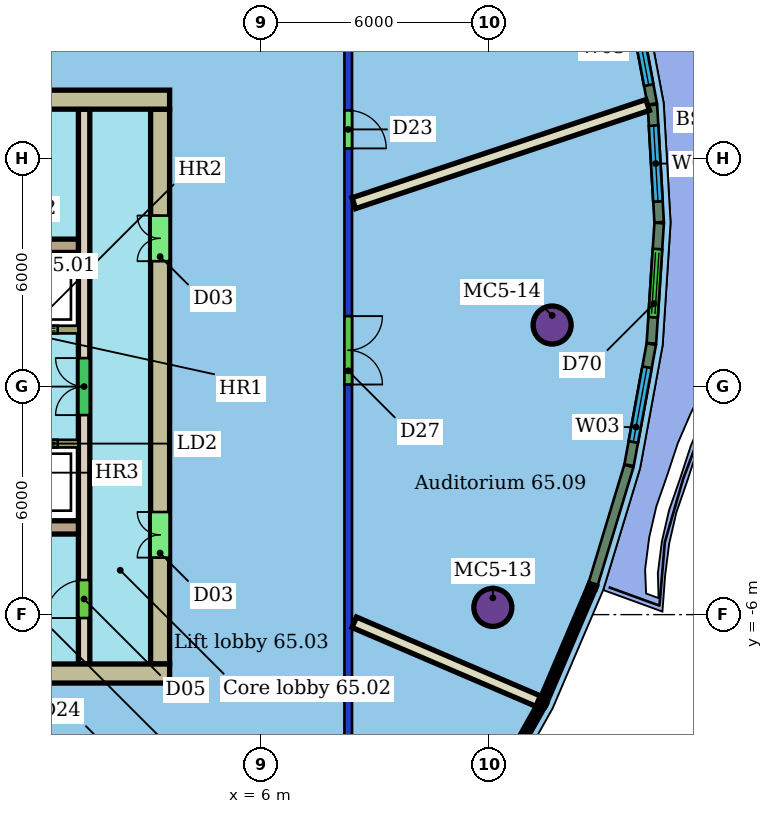
"""IFC4 building model, lengths in metres.
Left out: names, types, materials, properties, quantities, classifications, styles, units other than length and angle.
Written with IfcOpenShell. Run it as: python <this file> out.ifc"""

import sys

from ifc_helpers import new_model, si_unit, direction, frame, frame_2d, origin, origin_2d, place, context, subcontext, project, spatial, rectangle, hollow_circle, extrude, element, fill, save


model = new_model("IFC4")
c1 = context("Model", 3, precision=1e-05, world=origin(), true_north=direction((0.0, 1.0)))
c2 = subcontext(c1, "Body", "Model", "MODEL_VIEW")
j1 = project(units=[si_unit("LENGTHUNIT", "METRE"), si_unit("PLANEANGLEUNIT", "RADIAN")], contexts=[c1])
p1 = place(None, origin())
s1 = spatial("IfcSite", under=j1, at=p1, CompositionType="ELEMENT")
p2 = place(p1, origin())
s2 = spatial("IfcBuilding", under=s1, at=p2, CompositionType="ELEMENT")
p3 = place(p2, frame((0.0, 0.0, 264.9)))
s3 = spatial("IfcBuildingStorey", under=s2, at=p3, CompositionType="ELEMENT", Elevation=264.9)
for number, where, z_axis, x_axis in (
    (1, (12.106, -5.81, 0.0), (0.0, 0.0, 1.0), (1.0, 0.0, 0.0)),
    (2, (13.666, 1.62, 0.0), (0.0, 0.0, 1.0), (1.0, 0.0, 0.0)),
):
    element("IfcColumn", number, at=place(p3, frame(where, z_axis=z_axis, x_axis=x_axis)), inside=s3, PredefinedType="COLUMN", context=c2, shape_type="SweptSolid", body=[
        extrude(hollow_circle(Radius=0.5, WallThickness=0.04, at=origin_2d()), origin(), (0.0, 0.0, 1.0), 3.45),
    ])
p4 = place(p3, frame((8.3, 9.8, 0.0), z_axis=(0.0, 0.0, 1.0), x_axis=(0.0, -1.0, 0.0)))
e3 = element("IfcWall", 3, at=p4, inside=s3, PredefinedType="PARTITIONING", context=c2, shape_type="SweptSolid", body=[
    extrude(rectangle(XDim=19.6, YDim=0.2, at=frame_2d((9.8, 0.0))), origin(), (0.0, 0.0, 1.0), 3.1),
])
p5 = place(p4, frame((7.946, 0.0, 0.0)))
e4 = element("IfcOpeningElement", 4, at=p5, cuts=e3, PredefinedType="OPENING", context=c2, shape_type="SweptSolid", body=[
    extrude(rectangle(XDim=1.8, YDim=2.4, at=frame_2d((0.9, 1.2))), frame((0.0, 0.11, 0.0), z_axis=(0.0, -1.0, 0.0), x_axis=(1.0, 0.0, 0.0)), (0.0, 0.0, 1.0), 0.22),
])
p6 = place(p4, frame((2.533, 0.0, 0.0)))
e5 = element("IfcOpeningElement", 5, at=p6, cuts=e3, PredefinedType="OPENING", context=c2, shape_type="SweptSolid", body=[
    extrude(rectangle(XDim=1.0, YDim=2.4, at=frame_2d((0.5, 1.2))), frame((0.0, 0.11, 0.0), z_axis=(0.0, -1.0, 0.0), x_axis=(1.0, 0.0, 0.0)), (0.0, 0.0, 1.0), 0.22),
])
p7 = place(p3, frame((13.298, -8.276, 0.0), z_axis=(0.0, 0.0, 1.0), x_axis=(-0.919039472238, 0.39416550898, 0.0)))
e6 = element("IfcWall", 6, at=p7, inside=s3, PredefinedType="PARTITIONING", context=c2, shape_type="SweptSolid", body=[
    extrude(rectangle(XDim=5.265, YDim=0.3, at=frame_2d((2.633, 0.0))), origin(), (0.0, 0.0, 1.0), 3.45),
])
p8 = place(p3, frame((16.179, 7.409, 0.0), z_axis=(0.0, 0.0, 1.0), x_axis=(-0.948479442835, -0.316838675858, 0.0)))
e7 = element("IfcWall", 7, at=p8, inside=s3, PredefinedType="PARTITIONING", context=c2, shape_type="SweptSolid", body=[
    extrude(rectangle(XDim=8.152, YDim=0.3, at=frame_2d((4.076, 0.0))), origin(), (0.0, 0.0, 1.0), 3.45),
])
p9 = place(p3, frame((14.744, -5.197, 0.0), z_axis=(0.0, 0.0, 1.0), x_axis=(0.289926029866, 0.957049056844, 0.0)))
e8 = element("IfcWall", 8, at=p9, inside=s3, PredefinedType="SOLIDWALL", context=c2, shape_type="SweptSolid", body=[
    extrude(rectangle(XDim=3.248, YDim=0.25, at=frame_2d((1.624, 0.0))), origin(), (0.0, 0.0, 1.0), 3.15),
])
p10 = place(p3, frame((15.691, -2.067, 0.0), z_axis=(0.0, 0.0, 1.0), x_axis=(0.180457976696, 0.983582695378, 0.0)))
e9 = element("IfcWall", 9, at=p10, inside=s3, PredefinedType="SOLIDWALL", context=c2, shape_type="SweptSolid", body=[
    extrude(rectangle(XDim=3.238, YDim=0.25, at=frame_2d((1.619, 0.0))), origin(), (0.0, 0.0, 1.0), 3.15),
])
p11 = place(p10, frame((0.619, 0.0, 0.9)))
e10 = element("IfcOpeningElement", 10, at=p11, cuts=e9, PredefinedType="OPENING", context=c2, shape_type="SweptSolid", body=[
    extrude(rectangle(XDim=2.0, YDim=2.1, at=frame_2d((1.0, 1.05))), frame((0.0, 0.135, 0.0), z_axis=(0.0, -1.0, 0.0), x_axis=(1.0, 0.0, 0.0)), (0.0, 0.0, 1.0), 0.27),
])
p12 = place(p3, frame((16.278, 1.139, 0.0), z_axis=(0.0, 0.0, 1.0), x_axis=(0.064473835275, 0.99791939783, 0.0)))
e11 = element("IfcWall", 11, at=p12, inside=s3, PredefinedType="SOLIDWALL", context=c2, shape_type="SweptSolid", body=[
    extrude(rectangle(XDim=3.169, YDim=0.25, at=frame_2d((1.585, 0.0))), origin(), (0.0, 0.0, 1.0), 3.15),
])
p13 = place(p12, frame((0.685, 0.0, 0.0)))
e12 = element("IfcOpeningElement", 12, at=p13, cuts=e11, PredefinedType="OPENING", context=c2, shape_type="SweptSolid", body=[
    extrude(rectangle(XDim=1.8, YDim=2.4, at=frame_2d((0.9, 1.2))), frame((0.0, 0.135, 0.0), z_axis=(0.0, -1.0, 0.0), x_axis=(1.0, 0.0, 0.0)), (0.0, 0.0, 1.0), 0.27),
])
p14 = place(p3, frame((16.482, 4.325, 0.0), z_axis=(0.0, 0.0, 1.0), x_axis=(-0.057643453345, 0.998337233747, 0.0)))
e13 = element("IfcWall", 13, at=p14, inside=s3, PredefinedType="SOLIDWALL", context=c2, shape_type="SweptSolid", body=[
    extrude(rectangle(XDim=3.092, YDim=0.25, at=frame_2d((1.546, 0.0))), origin(), (0.0, 0.0, 1.0), 3.15),
])
p15 = place(p14, frame((0.546, 0.0, 0.9)))
e14 = element("IfcOpeningElement", 14, at=p15, cuts=e13, PredefinedType="OPENING", context=c2, shape_type="SweptSolid", body=[
    extrude(rectangle(XDim=2.0, YDim=2.1, at=frame_2d((1.0, 1.05))), frame((0.0, 0.135, 0.0), z_axis=(0.0, -1.0, 0.0), x_axis=(1.0, 0.0, 0.0)), (0.0, 0.0, 1.0), 0.27),
])
p16 = place(p3, frame((16.301, 7.436, 0.0), z_axis=(0.0, 0.0, 1.0), x_axis=(-0.184915563493, 0.982754412037, 0.0)))
e15 = element("IfcWall", 15, at=p16, inside=s3, PredefinedType="SOLIDWALL", context=c2, shape_type="SweptSolid", body=[
    extrude(rectangle(XDim=3.009, YDim=0.25, at=frame_2d((1.504, 0.0))), origin(), (0.0, 0.0, 1.0), 3.15),
])
p17 = place(p16, frame((0.505, 0.0, 0.9)))
e16 = element("IfcOpeningElement", 16, at=p17, cuts=e15, PredefinedType="OPENING", context=c2, shape_type="SweptSolid", body=[
    extrude(rectangle(XDim=2.0, YDim=2.1, at=frame_2d((1.0, 1.05))), frame((0.0, 0.135, 0.0), z_axis=(0.0, -1.0, 0.0), x_axis=(1.0, 0.0, 0.0)), (0.0, 0.0, 1.0), 0.27),
])
p18 = place(p3, frame((3.6, 7.55, 0.0), z_axis=(0.0, 0.0, 1.0), x_axis=(-1.0, 0.0, 0.0)))
e17 = element("IfcWall", 17, at=p18, inside=s3, PredefinedType="SHEAR", context=c2, shape_type="SweptSolid", body=[
    extrude(rectangle(XDim=9.6, YDim=0.5, at=frame_2d((4.8, 0.0))), origin(), (0.0, 0.0, 1.0), 3.3),
])
p19 = place(p18, frame((3.2, 0.0, 0.0)))
e18 = element("IfcOpeningElement", 18, at=p19, cuts=e17, PredefinedType="OPENING", context=c2, shape_type="SweptSolid", body=[
    extrude(rectangle(XDim=1.2, YDim=2.1, at=frame_2d((0.6, 1.05))), frame((0.0, 0.26, 0.0), z_axis=(0.0, -1.0, 0.0), x_axis=(1.0, 0.0, 0.0)), (0.0, 0.0, 1.0), 0.52),
])
p20 = place(p3, frame((-15.6, -7.55, 0.0), z_axis=(0.0, 0.0, 1.0), x_axis=(1.0, 0.0, 0.0)))
e19 = element("IfcWall", 19, at=p20, inside=s3, PredefinedType="SHEAR", context=c2, shape_type="SweptSolid", body=[
    extrude(rectangle(XDim=19.2, YDim=0.5, at=frame_2d((9.6, 0.0))), origin(), (0.0, 0.0, 1.0), 3.3),
])
p21 = place(p20, frame((3.6, 0.0, 0.0)))
e20 = element("IfcOpeningElement", 20, at=p21, cuts=e19, PredefinedType="OPENING", context=c2, shape_type="SweptSolid", body=[
    extrude(rectangle(XDim=1.2, YDim=2.1, at=frame_2d((0.6, 1.05))), frame((0.0, 0.26, 0.0), z_axis=(0.0, -1.0, 0.0), x_axis=(1.0, 0.0, 0.0)), (0.0, 0.0, 1.0), 0.52),
])
p22 = place(p3, frame((3.35, -7.3, 0.0), z_axis=(0.0, 0.0, 1.0), x_axis=(0.0, 1.0, 0.0)))
e21 = element("IfcWall", 21, at=p22, inside=s3, PredefinedType="SHEAR", context=c2, shape_type="SweptSolid", body=[
    extrude(rectangle(XDim=14.6, YDim=0.5, at=frame_2d((7.3, 0.0))), origin(), (0.0, 0.0, 1.0), 3.3),
])
p23 = place(p22, frame((2.8, 0.0, 0.0)))
e22 = element("IfcOpeningElement", 22, at=p23, cuts=e21, PredefinedType="OPENING", context=c2, shape_type="SweptSolid", body=[
    extrude(rectangle(XDim=1.2, YDim=2.1, at=frame_2d((0.6, 1.05))), frame((0.0, 0.26, 0.0), z_axis=(0.0, -1.0, 0.0), x_axis=(1.0, 0.0, 0.0)), (0.0, 0.0, 1.0), 0.52),
])
p24 = place(p22, frame((10.6, 0.0, 0.0)))
e23 = element("IfcOpeningElement", 23, at=p24, cuts=e21, PredefinedType="OPENING", context=c2, shape_type="SweptSolid", body=[
    extrude(rectangle(XDim=1.2, YDim=2.1, at=frame_2d((0.6, 1.05))), frame((0.0, 0.26, 0.0), z_axis=(0.0, -1.0, 0.0), x_axis=(1.0, 0.0, 0.0)), (0.0, 0.0, 1.0), 0.52),
])
for number, where, z_axis, x_axis in (
    (24, (-6.0, 3.705, 0.0), (0.0, 0.0, 1.0), (1.0, 0.0, 0.0)),
    (25, (-6.0, -3.705, 0.0), (0.0, 0.0, 1.0), (1.0, 0.0, 0.0)),
):
    element("IfcWall", number, at=place(p3, frame(where, z_axis=z_axis, x_axis=x_axis)), inside=s3, PredefinedType="SHEAR", context=c2, shape_type="SweptSolid", body=[
        extrude(rectangle(XDim=7.2, YDim=0.35, at=frame_2d((3.6, 0.0))), origin(), (0.0, 0.0, 1.0), 3.3),
    ])
p25 = place(p3, frame((1.35, -7.3, 0.0), z_axis=(0.0, 0.0, 1.0), x_axis=(0.0, 1.0, 0.0)))
e26 = element("IfcWall", 26, at=p25, inside=s3, PredefinedType="SHEAR", context=c2, shape_type="SweptSolid", body=[
    extrude(rectangle(XDim=14.6, YDim=0.3, at=frame_2d((7.3, 0.0))), origin(), (0.0, 0.0, 1.0), 3.3),
])
p26 = place(p25, frame((1.21, 0.0, 0.0)))
e27 = element("IfcOpeningElement", 27, at=p26, cuts=e26, PredefinedType="OPENING", context=c2, shape_type="SweptSolid", body=[
    extrude(rectangle(XDim=1.0, YDim=2.1, at=frame_2d((0.5, 1.05))), frame((0.0, 0.16, 0.0), z_axis=(0.0, -1.0, 0.0), x_axis=(1.0, 0.0, 0.0)), (0.0, 0.0, 1.0), 0.32),
])
p27 = place(p25, frame((6.55, 0.0, 0.0)))
e28 = element("IfcOpeningElement", 28, at=p27, cuts=e26, PredefinedType="OPENING", context=c2, shape_type="SweptSolid", body=[
    extrude(rectangle(XDim=1.5, YDim=2.1, at=frame_2d((0.75, 1.05))), frame((0.0, 0.16, 0.0), z_axis=(0.0, -1.0, 0.0), x_axis=(1.0, 0.0, 0.0)), (0.0, 0.0, 1.0), 0.32),
])
p28 = place(p3, frame((-13.2, 1.5, 0.0), z_axis=(0.0, 0.0, 1.0), x_axis=(1.0, 0.0, 0.0)))
e29 = element("IfcWall", 29, at=p28, inside=s3, PredefinedType="SHEAR", context=c2, shape_type="SweptSolid", body=[
    extrude(rectangle(XDim=14.4, YDim=0.2, at=frame_2d((7.2, 0.0))), origin(), (0.0, 0.0, 1.0), 3.3),
])
p29 = place(p28, frame((10.312, 0.0, 0.0)))
e30 = element("IfcOpeningElement", 30, at=p29, cuts=e29, PredefinedType="OPENING", context=c2, shape_type="SweptSolid", body=[
    extrude(rectangle(XDim=1.1, YDim=2.1, at=frame_2d((0.55, 1.05))), frame((0.0, 0.11, 0.0), z_axis=(0.0, -1.0, 0.0), x_axis=(1.0, 0.0, 0.0)), (0.0, 0.0, 1.0), 0.22),
])
p30 = place(p28, frame((12.754, 0.0, 0.0)))
e31 = element("IfcOpeningElement", 31, at=p30, cuts=e29, PredefinedType="OPENING", context=c2, shape_type="SweptSolid", body=[
    extrude(rectangle(XDim=1.1, YDim=2.1, at=frame_2d((0.55, 1.05))), frame((0.0, 0.11, 0.0), z_axis=(0.0, -1.0, 0.0), x_axis=(1.0, 0.0, 0.0)), (0.0, 0.0, 1.0), 0.22),
])
p31 = place(p28, frame((0.15, 0.0, 0.0)))
e32 = element("IfcOpeningElement", 32, at=p31, cuts=e29, PredefinedType="OPENING", context=c2, shape_type="SweptSolid", body=[
    extrude(rectangle(XDim=0.9, YDim=2.1, at=frame_2d((0.45, 1.05))), frame((0.0, 0.11, 0.0), z_axis=(0.0, -1.0, 0.0), x_axis=(1.0, 0.0, 0.0)), (0.0, 0.0, 1.0), 0.22),
])
p32 = place(p28, frame((3.365, 0.0, 0.0)))
e33 = element("IfcOpeningElement", 33, at=p32, cuts=e29, PredefinedType="OPENING", context=c2, shape_type="SweptSolid", body=[
    extrude(rectangle(XDim=1.0, YDim=2.1, at=frame_2d((0.5, 1.05))), frame((0.0, 0.11, 0.0), z_axis=(0.0, -1.0, 0.0), x_axis=(1.0, 0.0, 0.0)), (0.0, 0.0, 1.0), 0.22),
])
p33 = place(p28, frame((8.467, 0.0, 0.0)))
e34 = element("IfcOpeningElement", 34, at=p33, cuts=e29, PredefinedType="OPENING", context=c2, shape_type="SweptSolid", body=[
    extrude(rectangle(XDim=0.9, YDim=2.1, at=frame_2d((0.45, 1.05))), frame((0.0, 0.11, 0.0), z_axis=(0.0, -1.0, 0.0), x_axis=(1.0, 0.0, 0.0)), (0.0, 0.0, 1.0), 0.22),
])
p34 = place(p3, frame((1.2, -1.5, 0.0), z_axis=(0.0, 0.0, 1.0), x_axis=(-1.0, 0.0, 0.0)))
e35 = element("IfcWall", 35, at=p34, inside=s3, PredefinedType="SHEAR", context=c2, shape_type="SweptSolid", body=[
    extrude(rectangle(XDim=14.4, YDim=0.2, at=frame_2d((7.2, 0.0))), origin(), (0.0, 0.0, 1.0), 3.3),
])
p35 = place(p34, frame((7.821, 0.0, 0.0)))
e36 = element("IfcOpeningElement", 36, at=p35, cuts=e35, PredefinedType="OPENING", context=c2, shape_type="SweptSolid", body=[
    extrude(rectangle(XDim=1.2, YDim=2.1, at=frame_2d((0.6, 1.05))), frame((0.0, 0.11, 0.0), z_axis=(0.0, -1.0, 0.0), x_axis=(1.0, 0.0, 0.0)), (0.0, 0.0, 1.0), 0.22),
])
p36 = place(p34, frame((0.546, 0.0, 0.0)))
e37 = element("IfcOpeningElement", 37, at=p36, cuts=e35, PredefinedType="OPENING", context=c2, shape_type="SweptSolid", body=[
    extrude(rectangle(XDim=1.1, YDim=2.1, at=frame_2d((0.55, 1.05))), frame((0.0, 0.11, 0.0), z_axis=(0.0, -1.0, 0.0), x_axis=(1.0, 0.0, 0.0)), (0.0, 0.0, 1.0), 0.22),
])
p37 = place(p34, frame((5.632, 0.0, 0.0)))
e38 = element("IfcOpeningElement", 38, at=p37, cuts=e35, PredefinedType="OPENING", context=c2, shape_type="SweptSolid", body=[
    extrude(rectangle(XDim=1.0, YDim=2.1, at=frame_2d((0.5, 1.05))), frame((0.0, 0.11, 0.0), z_axis=(0.0, -1.0, 0.0), x_axis=(1.0, 0.0, 0.0)), (0.0, 0.0, 1.0), 0.22),
])
p38 = place(p34, frame((2.592, 0.0, 0.0)))
e39 = element("IfcOpeningElement", 39, at=p38, cuts=e35, PredefinedType="OPENING", context=c2, shape_type="SweptSolid", body=[
    extrude(rectangle(XDim=1.0, YDim=2.1, at=frame_2d((0.5, 1.05))), frame((0.0, 0.11, 0.0), z_axis=(0.0, -1.0, 0.0), x_axis=(1.0, 0.0, 0.0)), (0.0, 0.0, 1.0), 0.22),
])
p39 = place(p5, origin())
e40 = element("IfcDoor", 40, at=p39, inside=s3, OperationType="DOUBLE_DOOR_SINGLE_SWING", PredefinedType="DOOR", context=c2, shape_type="SweptSolid", body=[
    extrude(rectangle(XDim=1.8, YDim=2.4, at=frame_2d((0.9, 1.2))), frame((0.0, 0.025, 0.0), z_axis=(0.0, -1.0, 0.0), x_axis=(1.0, 0.0, 0.0)), (0.0, 0.0, 1.0), 0.05),
])
fill(e4, e40)
p40 = place(p6, origin())
e41 = element("IfcDoor", 41, at=p40, inside=s3, OperationType="SINGLE_SWING_RIGHT", PredefinedType="DOOR", context=c2, shape_type="SweptSolid", body=[
    extrude(rectangle(XDim=1.0, YDim=2.4, at=frame_2d((0.5, 1.2))), frame((0.0, 0.025, 0.0), z_axis=(0.0, -1.0, 0.0), x_axis=(1.0, 0.0, 0.0)), (0.0, 0.0, 1.0), 0.05),
])
fill(e5, e41)
p41 = place(p11, origin())
e42 = element("IfcWindow", 42, at=p41, inside=s3, PartitioningType="SINGLE_PANEL", PredefinedType="WINDOW", context=c2, shape_type="SweptSolid", body=[
    extrude(rectangle(XDim=2.0, YDim=2.1, at=frame_2d((1.0, 1.05))), frame((0.0, 0.03, 0.0), z_axis=(0.0, -1.0, 0.0), x_axis=(1.0, 0.0, 0.0)), (0.0, 0.0, 1.0), 0.06),
])
fill(e10, e42)
p42 = place(p13, origin())
e43 = element("IfcDoor", 43, at=p42, inside=s3, OperationType="DOUBLE_DOOR_SLIDING", PredefinedType="DOOR", context=c2, shape_type="SweptSolid", body=[
    extrude(rectangle(XDim=1.8, YDim=2.4, at=frame_2d((0.9, 1.2))), frame((0.0, 0.025, 0.0), z_axis=(0.0, -1.0, 0.0), x_axis=(1.0, 0.0, 0.0)), (0.0, 0.0, 1.0), 0.05),
])
fill(e12, e43)
p43 = place(p15, origin())
e44 = element("IfcWindow", 44, at=p43, inside=s3, PartitioningType="SINGLE_PANEL", PredefinedType="WINDOW", context=c2, shape_type="SweptSolid", body=[
    extrude(rectangle(XDim=2.0, YDim=2.1, at=frame_2d((1.0, 1.05))), frame((0.0, 0.03, 0.0), z_axis=(0.0, -1.0, 0.0), x_axis=(1.0, 0.0, 0.0)), (0.0, 0.0, 1.0), 0.06),
])
fill(e14, e44)
p44 = place(p17, origin())
e45 = element("IfcWindow", 45, at=p44, inside=s3, PartitioningType="SINGLE_PANEL", PredefinedType="WINDOW", context=c2, shape_type="SweptSolid", body=[
    extrude(rectangle(XDim=2.0, YDim=2.1, at=frame_2d((1.0, 1.05))), frame((0.0, 0.03, 0.0), z_axis=(0.0, -1.0, 0.0), x_axis=(1.0, 0.0, 0.0)), (0.0, 0.0, 1.0), 0.06),
])
fill(e16, e45)
p45 = place(p23, origin())
e46 = element("IfcDoor", 46, at=p45, inside=s3, OperationType="DOUBLE_DOOR_SINGLE_SWING", PredefinedType="NOTDEFINED", context=c2, shape_type="SweptSolid", body=[
    extrude(rectangle(XDim=1.2, YDim=2.1, at=frame_2d((0.6, 1.05))), frame((0.0, 0.025, 0.0), z_axis=(0.0, -1.0, 0.0), x_axis=(1.0, 0.0, 0.0)), (0.0, 0.0, 1.0), 0.05),
])
fill(e22, e46)
p46 = place(p24, origin())
e47 = element("IfcDoor", 47, at=p46, inside=s3, OperationType="DOUBLE_DOOR_SINGLE_SWING", PredefinedType="NOTDEFINED", context=c2, shape_type="SweptSolid", body=[
    extrude(rectangle(XDim=1.2, YDim=2.1, at=frame_2d((0.6, 1.05))), frame((0.0, 0.025, 0.0), z_axis=(0.0, -1.0, 0.0), x_axis=(1.0, 0.0, 0.0)), (0.0, 0.0, 1.0), 0.05),
])
fill(e23, e47)
p47 = place(p26, origin())
e48 = element("IfcDoor", 48, at=p47, inside=s3, OperationType="SINGLE_SWING_LEFT", PredefinedType="NOTDEFINED", context=c2, shape_type="SweptSolid", body=[
    extrude(rectangle(XDim=1.0, YDim=2.1, at=frame_2d((0.5, 1.05))), frame((0.0, 0.025, 0.0), z_axis=(0.0, -1.0, 0.0), x_axis=(1.0, 0.0, 0.0)), (0.0, 0.0, 1.0), 0.05),
])
fill(e27, e48)
p48 = place(p27, origin())
e49 = element("IfcDoor", 49, at=p48, inside=s3, OperationType="DOUBLE_DOOR_SINGLE_SWING", PredefinedType="NOTDEFINED", context=c2, shape_type="SweptSolid", body=[
    extrude(rectangle(XDim=1.5, YDim=2.1, at=frame_2d((0.75, 1.05))), frame((0.0, 0.025, 0.0), z_axis=(0.0, -1.0, 0.0), x_axis=(1.0, 0.0, 0.0)), (0.0, 0.0, 1.0), 0.05),
])
fill(e28, e49)
p49 = place(p30, origin())
e50 = element("IfcDoor", 50, at=p49, inside=s3, OperationType="DOUBLE_DOOR_SLIDING", PredefinedType="NOTDEFINED", context=c2, shape_type="SweptSolid", body=[
    extrude(rectangle(XDim=1.1, YDim=2.1, at=frame_2d((0.55, 1.05))), frame((0.0, 0.025, 0.0), z_axis=(0.0, -1.0, 0.0), x_axis=(1.0, 0.0, 0.0)), (0.0, 0.0, 1.0), 0.05),
])
fill(e31, e50)
p50 = place(p36, origin())
e51 = element("IfcDoor", 51, at=p50, inside=s3, OperationType="DOUBLE_DOOR_SLIDING", PredefinedType="NOTDEFINED", context=c2, shape_type="SweptSolid", body=[
    extrude(rectangle(XDim=1.1, YDim=2.1, at=frame_2d((0.55, 1.05))), frame((0.0, 0.025, 0.0), z_axis=(0.0, -1.0, 0.0), x_axis=(1.0, 0.0, 0.0)), (0.0, 0.0, 1.0), 0.05),
])
fill(e37, e51)
save(model, sys.argv[1])
